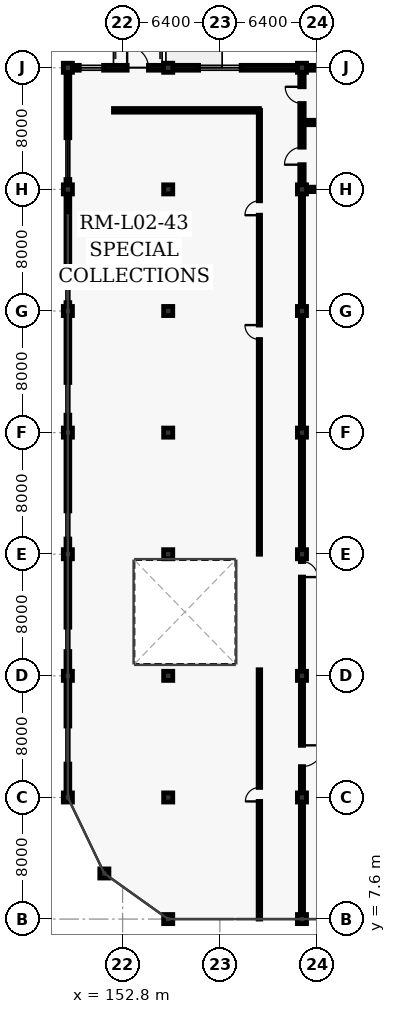
"""IFC4 building model, lengths in metres.
Left out: names, types, materials, properties, quantities, classifications, styles, units other than length and angle.
Written with IfcOpenShell. Run it as: python <this file> out.ifc"""

import sys

from ifc_helpers import new_model, si_unit, direction, frame, frame_2d, origin, origin_2d, place, context, subcontext, project, spatial, rectangle, extrude, element, fill, save


model = new_model("IFC4")
c1 = context("Model", 3, precision=1e-05, world=origin(), true_north=direction((0.0, 1.0)))
c2 = subcontext(c1, "Body", "Model", "MODEL_VIEW")
j1 = project(units=[si_unit("LENGTHUNIT", "METRE"), si_unit("PLANEANGLEUNIT", "RADIAN")], contexts=[c1])
p1 = place(None, origin())
s1 = spatial("IfcSite", under=j1, at=p1, CompositionType="ELEMENT")
p2 = place(p1, origin())
s2 = spatial("IfcBuilding", under=s1, at=p2, CompositionType="ELEMENT")
p3 = place(p2, frame((0.0, 0.0, 10.2)))
s3 = spatial("IfcBuildingStorey", under=s2, at=p3, CompositionType="ELEMENT", Elevation=10.2)
for number, where, z_axis, x_axis in (
    (1, (149.2, 15.6, 0.0), (0.0, 0.0, 1.0), (1.0, 0.0, 0.0)),
    (2, (149.2, 23.6, 0.0), (0.0, 0.0, 1.0), (1.0, 0.0, 0.0)),
    (3, (149.2, 31.6, 0.0), (0.0, 0.0, 1.0), (1.0, 0.0, 0.0)),
    (4, (149.2, 39.6, 0.0), (0.0, 0.0, 1.0), (1.0, 0.0, 0.0)),
    (5, (149.2, 47.6, 0.0), (0.0, 0.0, 1.0), (1.0, 0.0, 0.0)),
    (6, (149.2, 55.6, 0.0), (0.0, 0.0, 1.0), (1.0, 0.0, 0.0)),
    (7, (149.2, 63.6, 0.0), (0.0, 0.0, 1.0), (1.0, 0.0, 0.0)),
    (8, (151.6, 10.6, 0.0), (0.0, 0.0, 1.0), (1.0, 0.0, 0.0)),
    (9, (155.8, 7.6, 0.0), (0.0, 0.0, 1.0), (1.0, 0.0, 0.0)),
    (10, (155.8, 15.6, 0.0), (0.0, 0.0, 1.0), (1.0, 0.0, 0.0)),
    (11, (155.8, 23.6, 0.0), (0.0, 0.0, 1.0), (1.0, 0.0, 0.0)),
    (12, (155.8, 31.6, 0.0), (0.0, 0.0, 1.0), (1.0, 0.0, 0.0)),
    (13, (155.8, 39.6, 0.0), (0.0, 0.0, 1.0), (1.0, 0.0, 0.0)),
    (14, (155.8, 47.6, 0.0), (0.0, 0.0, 1.0), (1.0, 0.0, 0.0)),
    (15, (155.8, 55.6, 0.0), (0.0, 0.0, 1.0), (1.0, 0.0, 0.0)),
    (16, (155.8, 63.6, 0.0), (0.0, 0.0, 1.0), (1.0, 0.0, 0.0)),
    (17, (164.6, 7.6, 0.0), (0.0, 0.0, 1.0), (1.0, 0.0, 0.0)),
    (18, (164.6, 15.6, 0.0), (0.0, 0.0, 1.0), (1.0, 0.0, 0.0)),
    (19, (164.6, 23.6, 0.0), (0.0, 0.0, 1.0), (1.0, 0.0, 0.0)),
    (20, (164.6, 31.6, 0.0), (0.0, 0.0, 1.0), (1.0, 0.0, 0.0)),
    (21, (164.6, 39.6, 0.0), (0.0, 0.0, 1.0), (1.0, 0.0, 0.0)),
    (22, (164.6, 47.6, 0.0), (0.0, 0.0, 1.0), (1.0, 0.0, 0.0)),
    (23, (164.6, 55.6, 0.0), (0.0, 0.0, 1.0), (1.0, 0.0, 0.0)),
    (24, (164.6, 63.6, 0.0), (0.0, 0.0, 1.0), (1.0, 0.0, 0.0)),
):
    element("IfcColumn", number, at=place(p3, frame(where, z_axis=z_axis, x_axis=x_axis)), inside=s3, PredefinedType="COLUMN", context=c2, shape_type="SweptSolid", body=[
        extrude(rectangle(XDim=0.6, YDim=0.6, at=origin_2d()), origin(), (0.0, 0.0, 1.0), 5.4),
    ])
p4 = place(p3, frame((149.2, 15.6, 0.0), z_axis=(0.0, 0.0, 1.0), x_axis=(0.0, 1.0, 0.0)))
e25 = element("IfcWall", 25, at=p4, inside=s3, PredefinedType="SOLIDWALL", context=c2, shape_type="SweptSolid", body=[
    extrude(rectangle(XDim=48.0, YDim=0.25, at=frame_2d((24.0, 0.0))), origin(), (0.0, 0.0, 1.0), 4.3),
])
p5 = place(p4, frame((2.2, 0.0, 0.8)))
e26 = element("IfcOpeningElement", 26, at=p5, cuts=e25, PredefinedType="OPENING", context=c2, shape_type="SweptSolid", body=[
    extrude(rectangle(XDim=2.5, YDim=2.3, at=frame_2d((1.25, 1.15))), frame((0.0, 0.135, 0.0), z_axis=(0.0, -1.0, 0.0), x_axis=(1.0, 0.0, 0.0)), (0.0, 0.0, 1.0), 0.27),
])
p6 = place(p4, frame((9.6, 0.0, 0.8)))
e27 = element("IfcOpeningElement", 27, at=p6, cuts=e25, PredefinedType="OPENING", context=c2, shape_type="SweptSolid", body=[
    extrude(rectangle(XDim=1.6, YDim=2.75, at=frame_2d((0.8, 1.375))), frame((0.0, 0.135, 0.0), z_axis=(0.0, -1.0, 0.0), x_axis=(1.0, 0.0, 0.0)), (0.0, 0.0, 1.0), 0.27),
])
p7 = place(p4, frame((17.0, 0.0, 0.8)))
e28 = element("IfcOpeningElement", 28, at=p7, cuts=e25, PredefinedType="OPENING", context=c2, shape_type="SweptSolid", body=[
    extrude(rectangle(XDim=1.85, YDim=2.75, at=frame_2d((0.925, 1.375))), frame((0.0, 0.135, 0.0), z_axis=(0.0, -1.0, 0.0), x_axis=(1.0, 0.0, 0.0)), (0.0, 0.0, 1.0), 0.27),
])
p8 = place(p4, frame((25.15, 0.0, 0.8)))
e29 = element("IfcOpeningElement", 29, at=p8, cuts=e25, PredefinedType="OPENING", context=c2, shape_type="SweptSolid", body=[
    extrude(rectangle(XDim=2.15, YDim=2.8, at=frame_2d((1.075, 1.4))), frame((0.0, 0.135, 0.0), z_axis=(0.0, -1.0, 0.0), x_axis=(1.0, 0.0, 0.0)), (0.0, 0.0, 1.0), 0.27),
])
p9 = place(p4, frame((32.55, 0.0, 0.8)))
e30 = element("IfcOpeningElement", 30, at=p9, cuts=e25, PredefinedType="OPENING", context=c2, shape_type="SweptSolid", body=[
    extrude(rectangle(XDim=2.45, YDim=2.8, at=frame_2d((1.225, 1.4))), frame((0.0, 0.135, 0.0), z_axis=(0.0, -1.0, 0.0), x_axis=(1.0, 0.0, 0.0)), (0.0, 0.0, 1.0), 0.27),
])
p10 = place(p4, frame((40.65, 0.0, 0.8)))
e31 = element("IfcOpeningElement", 31, at=p10, cuts=e25, PredefinedType="OPENING", context=c2, shape_type="SweptSolid", body=[
    extrude(rectangle(XDim=2.75, YDim=2.85, at=frame_2d((1.375, 1.425))), frame((0.0, 0.135, 0.0), z_axis=(0.0, -1.0, 0.0), x_axis=(1.0, 0.0, 0.0)), (0.0, 0.0, 1.0), 0.27),
])
p11 = place(p3, frame((149.2, 63.6, 0.0), z_axis=(0.0, 0.0, 1.0), x_axis=(1.0, 0.0, 0.0)))
e32 = element("IfcWall", 32, at=p11, inside=s3, PredefinedType="SOLIDWALL", context=c2, shape_type="SweptSolid", body=[
    extrude(rectangle(XDim=22.8, YDim=0.32, at=frame_2d((11.4, 0.0))), origin(), (0.0, 0.0, 1.0), 4.3),
])
p12 = place(p11, frame((0.75, 0.0, 0.9)))
e33 = element("IfcOpeningElement", 33, at=p12, cuts=e32, PredefinedType="OPENING", context=c2, shape_type="SweptSolid", body=[
    extrude(rectangle(XDim=1.6, YDim=1.65, at=frame_2d((0.8, 0.825))), frame((0.0, 0.17, 0.0), z_axis=(0.0, -1.0, 0.0), x_axis=(1.0, 0.0, 0.0)), (0.0, 0.0, 1.0), 0.34),
])
p13 = place(p11, frame((8.6, 0.0, 0.9)))
e34 = element("IfcOpeningElement", 34, at=p13, cuts=e32, PredefinedType="OPENING", context=c2, shape_type="SweptSolid", body=[
    extrude(rectangle(XDim=2.8, YDim=2.4, at=frame_2d((1.4, 1.2))), frame((0.0, 0.17, 0.0), z_axis=(0.0, -1.0, 0.0), x_axis=(1.0, 0.0, 0.0)), (0.0, 0.0, 1.0), 0.34),
])
p14 = place(p11, frame((3.9, 0.0, 0.0)))
e35 = element("IfcOpeningElement", 35, at=p14, cuts=e32, PredefinedType="OPENING", context=c2, shape_type="SweptSolid", body=[
    extrude(rectangle(XDim=1.4, YDim=2.25, at=frame_2d((0.7, 1.125))), frame((0.0, 0.17, 0.0), z_axis=(0.0, -1.0, 0.0), x_axis=(1.0, 0.0, 0.0)), (0.0, 0.0, 1.0), 0.34),
])
p15 = place(p3, frame((164.902, 55.6, 0.0), z_axis=(0.0, 0.0, 1.0), x_axis=(1.0, 0.0, 0.0)))
e36 = element("IfcWall", 36, at=p15, inside=s3, PredefinedType="SHEAR", context=c2, shape_type="SweptSolid", body=[
    extrude(rectangle(XDim=6.796, YDim=0.29, at=frame_2d((3.398, 0.0))), origin(), (0.0, 0.0, 1.0), 5.15),
])
p16 = place(p3, frame((164.6, 55.902, 0.0), z_axis=(0.0, 0.0, 1.0), x_axis=(0.0, 1.0, 0.0)))
e37 = element("IfcWall", 37, at=p16, inside=s3, PredefinedType="SHEAR", context=c2, shape_type="SweptSolid", body=[
    extrude(rectangle(XDim=7.396, YDim=0.29, at=frame_2d((3.698, 0.0))), origin(), (0.0, 0.0, 1.0), 5.15),
])
p17 = place(p16, frame((5.348, 0.0, 0.0)))
e38 = element("IfcOpeningElement", 38, at=p17, cuts=e37, PredefinedType="OPENING", context=c2, shape_type="SweptSolid", body=[
    extrude(rectangle(XDim=1.1, YDim=2.15, at=frame_2d((0.55, 1.075))), frame((0.0, 0.155, 0.0), z_axis=(0.0, -1.0, 0.0), x_axis=(1.0, 0.0, 0.0)), (0.0, 0.0, 1.0), 0.31),
])
p18 = place(p16, frame((1.323, 0.0, 0.0)))
e39 = element("IfcOpeningElement", 39, at=p18, cuts=e37, PredefinedType="OPENING", context=c2, shape_type="SweptSolid", body=[
    extrude(rectangle(XDim=1.15, YDim=2.2, at=frame_2d((0.575, 1.1))), frame((0.0, 0.155, 0.0), z_axis=(0.0, -1.0, 0.0), x_axis=(1.0, 0.0, 0.0)), (0.0, 0.0, 1.0), 0.31),
])
p19 = place(p3, frame((164.745, 60.0, 0.0), z_axis=(0.0, 0.0, 1.0), x_axis=(1.0, 0.0, 0.0)))
e40 = element("IfcWall", 40, at=p19, inside=s3, PredefinedType="SHEAR", context=c2, shape_type="SweptSolid", body=[
    extrude(rectangle(XDim=7.11, YDim=0.29, at=frame_2d((3.555, 0.0))), origin(), (0.0, 0.0, 1.0), 5.15),
])
p20 = place(p3, frame((161.8, 7.6, 0.0), z_axis=(0.0, 0.0, 1.0), x_axis=(0.0, 1.0, 0.0)))
e41 = element("IfcWall", 41, at=p20, inside=s3, PredefinedType="PARTITIONING", context=c2, shape_type="SweptSolid", body=[
    extrude(rectangle(XDim=16.4, YDim=0.165, at=frame_2d((8.2, 0.0))), origin(), (0.0, 0.0, 1.0), 5.15),
])
p21 = place(p20, frame((7.74, 0.0, 0.0)))
e42 = element("IfcOpeningElement", 42, at=p21, cuts=e41, PredefinedType="OPENING", context=c2, shape_type="SweptSolid", body=[
    extrude(rectangle(XDim=0.92, YDim=2.1, at=frame_2d((0.46, 1.05))), frame((0.0, 0.093, 0.0), z_axis=(0.0, -1.0, 0.0), x_axis=(1.0, 0.0, 0.0)), (0.0, 0.0, 1.0), 0.185),
])
p22 = place(p3, frame((161.8, 31.6, 0.0), z_axis=(0.0, 0.0, 1.0), x_axis=(0.0, 1.0, 0.0)))
e43 = element("IfcWall", 43, at=p22, inside=s3, PredefinedType="PARTITIONING", context=c2, shape_type="SweptSolid", body=[
    extrude(rectangle(XDim=29.2, YDim=0.15, at=frame_2d((14.6, 0.0))), origin(), (0.0, 0.0, 1.0), 5.15),
])
p23 = place(p22, frame((14.125, 0.0, 0.0)))
e44 = element("IfcOpeningElement", 44, at=p23, cuts=e43, PredefinedType="OPENING", context=c2, shape_type="SweptSolid", body=[
    extrude(rectangle(XDim=0.95, YDim=2.1, at=frame_2d((0.475, 1.05))), frame((0.0, 0.085, 0.0), z_axis=(0.0, -1.0, 0.0), x_axis=(1.0, 0.0, 0.0)), (0.0, 0.0, 1.0), 0.17),
])
p24 = place(p22, frame((22.301, 0.0, 0.0)))
e45 = element("IfcOpeningElement", 45, at=p24, cuts=e43, PredefinedType="OPENING", context=c2, shape_type="SweptSolid", body=[
    extrude(rectangle(XDim=0.95, YDim=2.1, at=frame_2d((0.475, 1.05))), frame((0.0, 0.085, 0.0), z_axis=(0.0, -1.0, 0.0), x_axis=(1.0, 0.0, 0.0)), (0.0, 0.0, 1.0), 0.17),
])
p25 = place(p3, frame((161.8, 60.8, 0.0), z_axis=(0.0, 0.0, 1.0), x_axis=(-1.0, 0.0, 0.0)))
e46 = element("IfcWall", 46, at=p25, inside=s3, PredefinedType="PARTITIONING", context=c2, shape_type="SweptSolid", body=[
    extrude(rectangle(XDim=9.6, YDim=0.24, at=frame_2d((4.8, 0.0))), origin(), (0.0, 0.0, 1.0), 5.15),
])
p26 = place(p3, frame((164.6, 55.298, 0.0), z_axis=(0.0, 0.0, 1.0), x_axis=(0.0, -1.0, 0.0)))
e47 = element("IfcWall", 47, at=p26, inside=s3, PredefinedType="PARTITIONING", context=c2, shape_type="SweptSolid", body=[
    extrude(rectangle(XDim=47.396, YDim=0.21, at=frame_2d((23.698, 0.0))), origin(), (0.0, 0.0, 1.0), 4.3),
])
p27 = place(p26, frame((24.18, 0.0, 0.0)))
e48 = element("IfcOpeningElement", 48, at=p27, cuts=e47, PredefinedType="OPENING", context=c2, shape_type="SweptSolid", body=[
    extrude(rectangle(XDim=1.02, YDim=2.1, at=frame_2d((0.51, 1.05))), frame((0.0, 0.115, 0.0), z_axis=(0.0, -1.0, 0.0), x_axis=(1.0, 0.0, 0.0)), (0.0, 0.0, 1.0), 0.23),
])
p28 = place(p26, frame((36.269, 0.0, 0.0)))
e49 = element("IfcOpeningElement", 49, at=p28, cuts=e47, PredefinedType="OPENING", context=c2, shape_type="SweptSolid", body=[
    extrude(rectangle(XDim=1.4, YDim=2.25, at=frame_2d((0.7, 1.125))), frame((0.0, 0.115, 0.0), z_axis=(0.0, -1.0, 0.0), x_axis=(1.0, 0.0, 0.0)), (0.0, 0.0, 1.0), 0.23),
])
p29 = place(p5, origin())
e50 = element("IfcWindow", 50, at=p29, inside=s3, PartitioningType="SINGLE_PANEL", PredefinedType="WINDOW", context=c2, shape_type="SweptSolid", body=[
    extrude(rectangle(XDim=2.5, YDim=2.3, at=frame_2d((1.25, 1.15))), frame((0.0, 0.03, 0.0), z_axis=(0.0, -1.0, 0.0), x_axis=(1.0, 0.0, 0.0)), (0.0, 0.0, 1.0), 0.06),
])
fill(e26, e50)
p30 = place(p6, origin())
e51 = element("IfcWindow", 51, at=p30, inside=s3, PartitioningType="SINGLE_PANEL", PredefinedType="WINDOW", context=c2, shape_type="SweptSolid", body=[
    extrude(rectangle(XDim=1.6, YDim=2.75, at=frame_2d((0.8, 1.375))), frame((0.0, 0.03, 0.0), z_axis=(0.0, -1.0, 0.0), x_axis=(1.0, 0.0, 0.0)), (0.0, 0.0, 1.0), 0.06),
])
fill(e27, e51)
p31 = place(p7, origin())
e52 = element("IfcWindow", 52, at=p31, inside=s3, PartitioningType="SINGLE_PANEL", PredefinedType="WINDOW", context=c2, shape_type="SweptSolid", body=[
    extrude(rectangle(XDim=1.85, YDim=2.75, at=frame_2d((0.925, 1.375))), frame((0.0, 0.03, 0.0), z_axis=(0.0, -1.0, 0.0), x_axis=(1.0, 0.0, 0.0)), (0.0, 0.0, 1.0), 0.06),
])
fill(e28, e52)
p32 = place(p8, origin())
e53 = element("IfcWindow", 53, at=p32, inside=s3, PartitioningType="SINGLE_PANEL", PredefinedType="WINDOW", context=c2, shape_type="SweptSolid", body=[
    extrude(rectangle(XDim=2.15, YDim=2.8, at=frame_2d((1.075, 1.4))), frame((0.0, 0.03, 0.0), z_axis=(0.0, -1.0, 0.0), x_axis=(1.0, 0.0, 0.0)), (0.0, 0.0, 1.0), 0.06),
])
fill(e29, e53)
p33 = place(p9, origin())
e54 = element("IfcWindow", 54, at=p33, inside=s3, PartitioningType="SINGLE_PANEL", PredefinedType="WINDOW", context=c2, shape_type="SweptSolid", body=[
    extrude(rectangle(XDim=2.45, YDim=2.8, at=frame_2d((1.225, 1.4))), frame((0.0, 0.03, 0.0), z_axis=(0.0, -1.0, 0.0), x_axis=(1.0, 0.0, 0.0)), (0.0, 0.0, 1.0), 0.06),
])
fill(e30, e54)
p34 = place(p10, origin())
e55 = element("IfcWindow", 55, at=p34, inside=s3, PartitioningType="SINGLE_PANEL", PredefinedType="WINDOW", context=c2, shape_type="SweptSolid", body=[
    extrude(rectangle(XDim=2.75, YDim=2.85, at=frame_2d((1.375, 1.425))), frame((0.0, 0.03, 0.0), z_axis=(0.0, -1.0, 0.0), x_axis=(1.0, 0.0, 0.0)), (0.0, 0.0, 1.0), 0.06),
])
fill(e31, e55)
p35 = place(p12, origin())
e56 = element("IfcWindow", 56, at=p35, inside=s3, PartitioningType="SINGLE_PANEL", PredefinedType="WINDOW", context=c2, shape_type="SweptSolid", body=[
    extrude(rectangle(XDim=1.6, YDim=1.65, at=frame_2d((0.8, 0.825))), frame((0.0, 0.03, 0.0), z_axis=(0.0, -1.0, 0.0), x_axis=(1.0, 0.0, 0.0)), (0.0, 0.0, 1.0), 0.06),
])
fill(e33, e56)
p36 = place(p13, origin())
e57 = element("IfcWindow", 57, at=p36, inside=s3, PartitioningType="SINGLE_PANEL", PredefinedType="WINDOW", context=c2, shape_type="SweptSolid", body=[
    extrude(rectangle(XDim=2.8, YDim=2.4, at=frame_2d((1.4, 1.2))), frame((0.0, 0.03, 0.0), z_axis=(0.0, -1.0, 0.0), x_axis=(1.0, 0.0, 0.0)), (0.0, 0.0, 1.0), 0.06),
])
fill(e34, e57)
p37 = place(p17, origin())
e58 = element("IfcDoor", 58, at=p37, inside=s3, OperationType="SINGLE_SWING_RIGHT", PredefinedType="DOOR", context=c2, shape_type="SweptSolid", body=[
    extrude(rectangle(XDim=1.1, YDim=2.15, at=frame_2d((0.55, 1.075))), frame((0.0, 0.025, 0.0), z_axis=(0.0, -1.0, 0.0), x_axis=(1.0, 0.0, 0.0)), (0.0, 0.0, 1.0), 0.05),
])
fill(e38, e58)
p38 = place(p18, origin())
e59 = element("IfcDoor", 59, at=p38, inside=s3, OperationType="SINGLE_SWING_LEFT", PredefinedType="DOOR", context=c2, shape_type="SweptSolid", body=[
    extrude(rectangle(XDim=1.15, YDim=2.2, at=frame_2d((0.575, 1.1))), frame((0.0, 0.025, 0.0), z_axis=(0.0, -1.0, 0.0), x_axis=(1.0, 0.0, 0.0)), (0.0, 0.0, 1.0), 0.05),
])
fill(e39, e59)
p39 = place(p14, origin())
e60 = element("IfcDoor", 60, at=p39, inside=s3, OperationType="SINGLE_SWING_LEFT", PredefinedType="DOOR", context=c2, shape_type="SweptSolid", body=[
    extrude(rectangle(XDim=1.4, YDim=2.25, at=frame_2d((0.7, 1.125))), frame((0.0, 0.025, 0.0), z_axis=(0.0, -1.0, 0.0), x_axis=(1.0, 0.0, 0.0)), (0.0, 0.0, 1.0), 0.05),
])
fill(e35, e60)
p40 = place(p21, origin())
e61 = element("IfcDoor", 61, at=p40, inside=s3, OperationType="SINGLE_SWING_LEFT", PredefinedType="DOOR", context=c2, shape_type="SweptSolid", body=[
    extrude(rectangle(XDim=0.92, YDim=2.1, at=frame_2d((0.46, 1.05))), frame((0.0, 0.025, 0.0), z_axis=(0.0, -1.0, 0.0), x_axis=(1.0, 0.0, 0.0)), (0.0, 0.0, 1.0), 0.05),
])
fill(e42, e61)
p41 = place(p23, origin())
e62 = element("IfcDoor", 62, at=p41, inside=s3, OperationType="SINGLE_SWING_RIGHT", PredefinedType="DOOR", context=c2, shape_type="SweptSolid", body=[
    extrude(rectangle(XDim=0.95, YDim=2.1, at=frame_2d((0.475, 1.05))), frame((0.0, 0.025, 0.0), z_axis=(0.0, -1.0, 0.0), x_axis=(1.0, 0.0, 0.0)), (0.0, 0.0, 1.0), 0.05),
])
fill(e44, e62)
p42 = place(p24, origin())
e63 = element("IfcDoor", 63, at=p42, inside=s3, OperationType="SINGLE_SWING_LEFT", PredefinedType="DOOR", context=c2, shape_type="SweptSolid", body=[
    extrude(rectangle(XDim=0.95, YDim=2.1, at=frame_2d((0.475, 1.05))), frame((0.0, 0.025, 0.0), z_axis=(0.0, -1.0, 0.0), x_axis=(1.0, 0.0, 0.0)), (0.0, 0.0, 1.0), 0.05),
])
fill(e45, e63)
p43 = place(p27, origin())
e64 = element("IfcDoor", 64, at=p43, inside=s3, OperationType="SINGLE_SWING_RIGHT", PredefinedType="DOOR", context=c2, shape_type="SweptSolid", body=[
    extrude(rectangle(XDim=1.02, YDim=2.1, at=frame_2d((0.51, 1.05))), frame((0.0, 0.025, 0.0), z_axis=(0.0, -1.0, 0.0), x_axis=(1.0, 0.0, 0.0)), (0.0, 0.0, 1.0), 0.05),
])
fill(e48, e64)
p44 = place(p28, origin())
e65 = element("IfcDoor", 65, at=p44, inside=s3, OperationType="SINGLE_SWING_LEFT", PredefinedType="DOOR", context=c2, shape_type="SweptSolid", body=[
    extrude(rectangle(XDim=1.4, YDim=2.25, at=frame_2d((0.7, 1.125))), frame((0.0, 0.025, 0.0), z_axis=(0.0, -1.0, 0.0), x_axis=(1.0, 0.0, 0.0)), (0.0, 0.0, 1.0), 0.05),
])
fill(e49, e65)
save(model, sys.argv[1])
